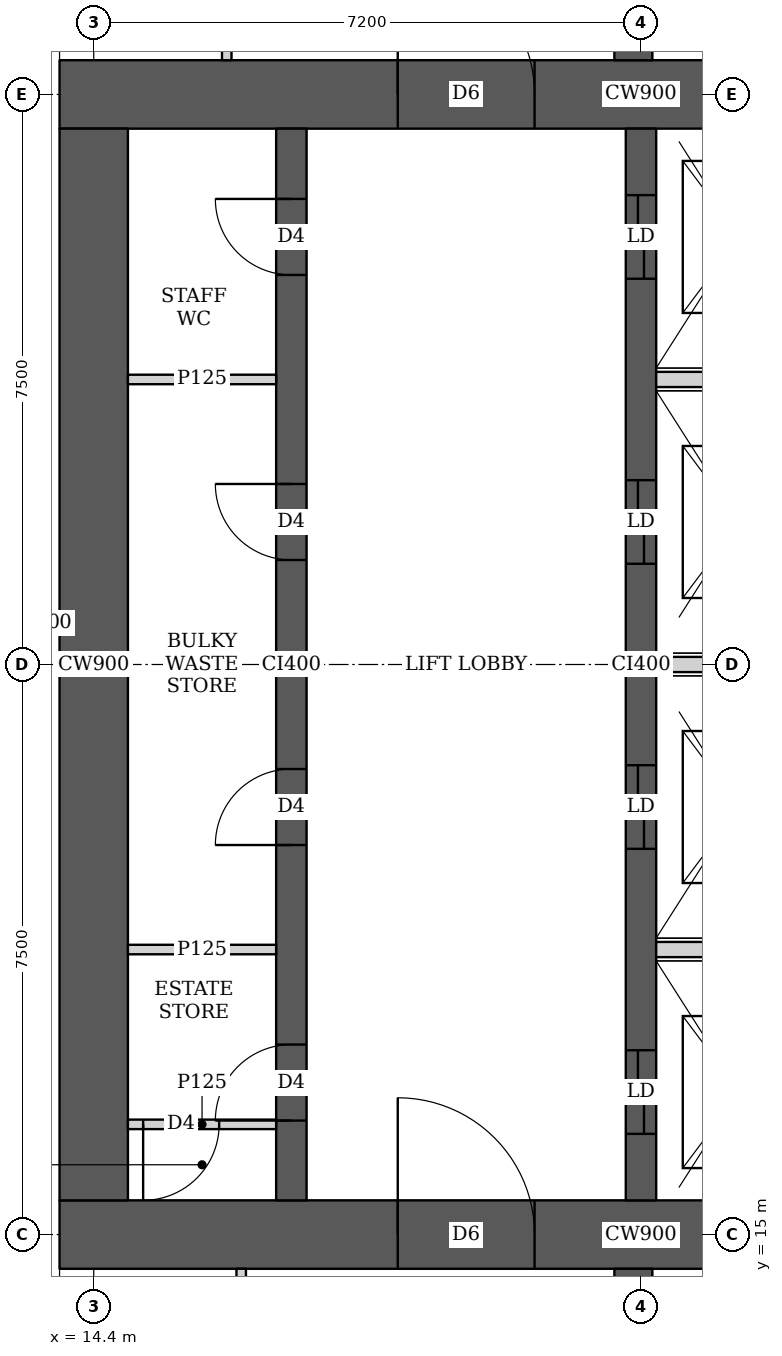
"""IFC4 building model, lengths in metres.
Left out: names, types, materials, properties, quantities, classifications, styles, units other than length and angle.
Written with IfcOpenShell. Run it as: python <this file> out.ifc"""

import sys

from ifc_helpers import new_model, si_unit, direction, frame, frame_2d, origin, place, context, subcontext, project, spatial, rectangle, extrude, element, fill, save


model = new_model("IFC4")
c1 = context("Model", 3, precision=1e-05, world=origin(), true_north=direction((0.0, 1.0)))
c2 = subcontext(c1, "Body", "Model", "MODEL_VIEW")
j1 = project(units=[si_unit("LENGTHUNIT", "METRE"), si_unit("PLANEANGLEUNIT", "RADIAN")], contexts=[c1])
p1 = place(None, origin())
s1 = spatial("IfcSite", under=j1, at=p1, CompositionType="ELEMENT")
p2 = place(p1, origin())
s2 = spatial("IfcBuilding", under=s1, at=p2, CompositionType="ELEMENT")
p3 = place(p2, frame((0.0, 0.0, 227.45)))
s3 = spatial("IfcBuildingStorey", under=s2, at=p3, CompositionType="ELEMENT", Elevation=227.45)
p4 = place(p3, frame((13.95, 15.0, 0.0), z_axis=(0.0, 0.0, 1.0), x_axis=(1.0, 0.0, 0.0)))
e1 = element("IfcWall", 1, at=p4, inside=s3, PredefinedType="SHEAR", context=c2, shape_type="SweptSolid", body=[
    extrude(rectangle(XDim=15.3, YDim=0.9, at=frame_2d((7.65, 0.0))), origin(), (0.0, 0.0, 1.0), 3.75),
])
p5 = place(p4, frame((4.45, 0.0, 0.0)))
e2 = element("IfcOpeningElement", 2, at=p5, cuts=e1, PredefinedType="OPENING", context=c2, shape_type="SweptSolid", body=[
    extrude(rectangle(XDim=1.8, YDim=2.1, at=frame_2d((0.9, 1.05))), frame((0.0, 0.46, 0.0), z_axis=(0.0, -1.0, 0.0), x_axis=(1.0, 0.0, 0.0)), (0.0, 0.0, 1.0), 0.92),
])
p6 = place(p4, frame((10.7, 0.0, 0.0)))
e3 = element("IfcOpeningElement", 3, at=p6, cuts=e1, PredefinedType="OPENING", context=c2, shape_type="SweptSolid", body=[
    extrude(rectangle(XDim=1.1, YDim=2.1, at=frame_2d((0.55, 1.05))), frame((0.0, 0.46, 0.0), z_axis=(0.0, -1.0, 0.0), x_axis=(1.0, 0.0, 0.0)), (0.0, 0.0, 1.0), 0.92),
])
p7 = place(p3, frame((13.95, 30.0, 0.0), z_axis=(0.0, 0.0, 1.0), x_axis=(1.0, 0.0, 0.0)))
e4 = element("IfcWall", 4, at=p7, inside=s3, PredefinedType="SHEAR", context=c2, shape_type="SweptSolid", body=[
    extrude(rectangle(XDim=15.3, YDim=0.9, at=frame_2d((7.65, 0.0))), origin(), (0.0, 0.0, 1.0), 3.75),
])
p8 = place(p7, frame((4.45, 0.0, 0.0)))
e5 = element("IfcOpeningElement", 5, at=p8, cuts=e4, PredefinedType="OPENING", context=c2, shape_type="SweptSolid", body=[
    extrude(rectangle(XDim=1.8, YDim=2.1, at=frame_2d((0.9, 1.05))), frame((0.0, 0.46, 0.0), z_axis=(0.0, -1.0, 0.0), x_axis=(1.0, 0.0, 0.0)), (0.0, 0.0, 1.0), 0.92),
])
p9 = place(p7, frame((10.7, 0.0, 0.0)))
e6 = element("IfcOpeningElement", 6, at=p9, cuts=e4, PredefinedType="OPENING", context=c2, shape_type="SweptSolid", body=[
    extrude(rectangle(XDim=1.1, YDim=2.1, at=frame_2d((0.55, 1.05))), frame((0.0, 0.46, 0.0), z_axis=(0.0, -1.0, 0.0), x_axis=(1.0, 0.0, 0.0)), (0.0, 0.0, 1.0), 0.92),
])
p10 = place(p3, frame((14.4, 15.45, 0.0), z_axis=(0.0, 0.0, 1.0), x_axis=(0.0, 1.0, 0.0)))
e7 = element("IfcWall", 7, at=p10, inside=s3, PredefinedType="SHEAR", context=c2, shape_type="SweptSolid", body=[
    extrude(rectangle(XDim=14.1, YDim=0.9, at=frame_2d((7.05, 0.0))), origin(), (0.0, 0.0, 1.0), 3.75),
])
p11 = place(p3, frame((17.0, 15.45, 0.0), z_axis=(0.0, 0.0, 1.0), x_axis=(0.0, 1.0, 0.0)))
e8 = element("IfcWall", 8, at=p11, inside=s3, PredefinedType="SHEAR", context=c2, shape_type="SweptSolid", body=[
    extrude(rectangle(XDim=14.1, YDim=0.4, at=frame_2d((7.05, 0.0))), origin(), (0.0, 0.0, 1.0), 3.75),
])
p12 = place(p11, frame((1.05, 0.0, 0.0)))
e9 = element("IfcOpeningElement", 9, at=p12, cuts=e8, PredefinedType="OPENING", context=c2, shape_type="SweptSolid", body=[
    extrude(rectangle(XDim=1.0, YDim=2.1, at=frame_2d((0.5, 1.05))), frame((0.0, 0.21, 0.0), z_axis=(0.0, -1.0, 0.0), x_axis=(1.0, 0.0, 0.0)), (0.0, 0.0, 1.0), 0.42),
])
p13 = place(p11, frame((4.675, 0.0, 0.0)))
e10 = element("IfcOpeningElement", 10, at=p13, cuts=e8, PredefinedType="OPENING", context=c2, shape_type="SweptSolid", body=[
    extrude(rectangle(XDim=1.0, YDim=2.1, at=frame_2d((0.5, 1.05))), frame((0.0, 0.21, 0.0), z_axis=(0.0, -1.0, 0.0), x_axis=(1.0, 0.0, 0.0)), (0.0, 0.0, 1.0), 0.42),
])
p14 = place(p11, frame((8.425, 0.0, 0.0)))
e11 = element("IfcOpeningElement", 11, at=p14, cuts=e8, PredefinedType="OPENING", context=c2, shape_type="SweptSolid", body=[
    extrude(rectangle(XDim=1.0, YDim=2.1, at=frame_2d((0.5, 1.05))), frame((0.0, 0.21, 0.0), z_axis=(0.0, -1.0, 0.0), x_axis=(1.0, 0.0, 0.0)), (0.0, 0.0, 1.0), 0.42),
])
p15 = place(p11, frame((12.175, 0.0, 0.0)))
e12 = element("IfcOpeningElement", 12, at=p15, cuts=e8, PredefinedType="OPENING", context=c2, shape_type="SweptSolid", body=[
    extrude(rectangle(XDim=1.0, YDim=2.1, at=frame_2d((0.5, 1.05))), frame((0.0, 0.21, 0.0), z_axis=(0.0, -1.0, 0.0), x_axis=(1.0, 0.0, 0.0)), (0.0, 0.0, 1.0), 0.42),
])
p16 = place(p3, frame((21.6, 15.45, 0.0), z_axis=(0.0, 0.0, 1.0), x_axis=(0.0, 1.0, 0.0)))
e13 = element("IfcWall", 13, at=p16, inside=s3, PredefinedType="SHEAR", context=c2, shape_type="SweptSolid", body=[
    extrude(rectangle(XDim=14.1, YDim=0.4, at=frame_2d((7.05, 0.0))), origin(), (0.0, 0.0, 1.0), 3.75),
])
p17 = place(p16, frame((0.875, 0.0, 0.0)))
e14 = element("IfcOpeningElement", 14, at=p17, cuts=e13, PredefinedType="OPENING", context=c2, shape_type="SweptSolid", body=[
    extrude(rectangle(XDim=1.1, YDim=2.1, at=frame_2d((0.55, 1.05))), frame((0.0, 0.21, 0.0), z_axis=(0.0, -1.0, 0.0), x_axis=(1.0, 0.0, 0.0)), (0.0, 0.0, 1.0), 0.42),
])
p18 = place(p16, frame((4.625, 0.0, 0.0)))
e15 = element("IfcOpeningElement", 15, at=p18, cuts=e13, PredefinedType="OPENING", context=c2, shape_type="SweptSolid", body=[
    extrude(rectangle(XDim=1.1, YDim=2.1, at=frame_2d((0.55, 1.05))), frame((0.0, 0.21, 0.0), z_axis=(0.0, -1.0, 0.0), x_axis=(1.0, 0.0, 0.0)), (0.0, 0.0, 1.0), 0.42),
])
p19 = place(p16, frame((8.375, 0.0, 0.0)))
e16 = element("IfcOpeningElement", 16, at=p19, cuts=e13, PredefinedType="OPENING", context=c2, shape_type="SweptSolid", body=[
    extrude(rectangle(XDim=1.1, YDim=2.1, at=frame_2d((0.55, 1.05))), frame((0.0, 0.21, 0.0), z_axis=(0.0, -1.0, 0.0), x_axis=(1.0, 0.0, 0.0)), (0.0, 0.0, 1.0), 0.42),
])
p20 = place(p16, frame((12.125, 0.0, 0.0)))
e17 = element("IfcOpeningElement", 17, at=p20, cuts=e13, PredefinedType="OPENING", context=c2, shape_type="SweptSolid", body=[
    extrude(rectangle(XDim=1.1, YDim=2.1, at=frame_2d((0.55, 1.05))), frame((0.0, 0.21, 0.0), z_axis=(0.0, -1.0, 0.0), x_axis=(1.0, 0.0, 0.0)), (0.0, 0.0, 1.0), 0.42),
])
for number, where, z_axis, x_axis in (
    (18, (21.5, 10.35, 0.0), (0.0, 0.0, 1.0), (0.0, 1.0, 0.0)),
    (19, (21.5, 30.45, 0.0), (0.0, 0.0, 1.0), (0.0, 1.0, 0.0)),
):
    element("IfcWall", number, at=place(p3, frame(where, z_axis=z_axis, x_axis=x_axis)), inside=s3, PredefinedType="SHEAR", context=c2, shape_type="SweptSolid", body=[
        extrude(rectangle(XDim=4.2, YDim=0.5, at=frame_2d((2.1, 0.0))), origin(), (0.0, 0.0, 1.0), 3.75),
    ])
p21 = place(p3, frame((16.34, 10.762, 0.0), z_axis=(0.0, 0.0, 1.0), x_axis=(0.0, 1.0, 0.0)))
e20 = element("IfcWall", 20, at=p21, inside=s3, PredefinedType="PARTITIONING", context=c2, shape_type="SweptSolid", body=[
    extrude(rectangle(XDim=3.788, YDim=0.125, at=frame_2d((1.894, 0.0))), origin(), (0.0, 0.0, 1.0), 3.5),
])
p22 = place(p21, frame((1.338, 0.0, 0.0)))
e21 = element("IfcOpeningElement", 21, at=p22, cuts=e20, PredefinedType="OPENING", context=c2, shape_type="SweptSolid", body=[
    extrude(rectangle(XDim=1.0, YDim=2.1, at=frame_2d((0.5, 1.05))), frame((0.0, 0.073, 0.0), z_axis=(0.0, -1.0, 0.0), x_axis=(1.0, 0.0, 0.0)), (0.0, 0.0, 1.0), 0.145),
])
p23 = place(p3, frame((16.15, 30.45, 0.0), z_axis=(0.0, 0.0, 1.0), x_axis=(0.0, 1.0, 0.0)))
e22 = element("IfcWall", 22, at=p23, inside=s3, PredefinedType="PARTITIONING", context=c2, shape_type="SweptSolid", body=[
    extrude(rectangle(XDim=4.137, YDim=0.125, at=frame_2d((2.068, 0.0))), origin(), (0.0, 0.0, 1.0), 3.5),
])
p24 = place(p23, frame((1.625, 0.0, 0.0)))
e23 = element("IfcOpeningElement", 23, at=p24, cuts=e22, PredefinedType="OPENING", context=c2, shape_type="SweptSolid", body=[
    extrude(rectangle(XDim=1.0, YDim=2.1, at=frame_2d((0.5, 1.05))), frame((0.0, 0.073, 0.0), z_axis=(0.0, -1.0, 0.0), x_axis=(1.0, 0.0, 0.0)), (0.0, 0.0, 1.0), 0.145),
])
p25 = place(p3, frame((14.85, 16.45, 0.0), z_axis=(0.0, 0.0, 1.0), x_axis=(1.0, 0.0, 0.0)))
e24 = element("IfcWall", 24, at=p25, inside=s3, PredefinedType="PARTITIONING", context=c2, shape_type="SweptSolid", body=[
    extrude(rectangle(XDim=1.95, YDim=0.125, at=frame_2d((0.975, 0.0))), origin(), (0.0, 0.0, 1.0), 3.5),
])
p26 = place(p25, frame((0.2, 0.0, 0.0)))
e25 = element("IfcOpeningElement", 25, at=p26, cuts=e24, PredefinedType="OPENING", context=c2, shape_type="SweptSolid", body=[
    extrude(rectangle(XDim=1.0, YDim=2.1, at=frame_2d((0.5, 1.05))), frame((0.0, 0.073, 0.0), z_axis=(0.0, -1.0, 0.0), x_axis=(1.0, 0.0, 0.0)), (0.0, 0.0, 1.0), 0.145),
])
for number, where, z_axis, x_axis in (
    (26, (14.85, 18.75, 0.0), (0.0, 0.0, 1.0), (1.0, 0.0, 0.0)),
    (27, (14.85, 26.25, 0.0), (0.0, 0.0, 1.0), (1.0, 0.0, 0.0)),
):
    element("IfcWall", number, at=place(p3, frame(where, z_axis=z_axis, x_axis=x_axis)), inside=s3, PredefinedType="PARTITIONING", context=c2, shape_type="SweptSolid", body=[
        extrude(rectangle(XDim=1.95, YDim=0.125, at=frame_2d((0.975, 0.0))), origin(), (0.0, 0.0, 1.0), 3.5),
    ])
for number, where, z_axis, x_axis in (
    (28, (21.8, 18.75, 0.0), (0.0, 0.0, 1.0), (1.0, 0.0, 0.0)),
    (29, (21.8, 22.5, 0.0), (0.0, 0.0, 1.0), (1.0, 0.0, 0.0)),
    (30, (21.8, 26.25, 0.0), (0.0, 0.0, 1.0), (1.0, 0.0, 0.0)),
):
    element("IfcWall", number, at=place(p3, frame(where, z_axis=z_axis, x_axis=x_axis)), inside=s3, PredefinedType="SOLIDWALL", context=c2, shape_type="SweptSolid", body=[
        extrude(rectangle(XDim=2.2, YDim=0.2, at=frame_2d((1.1, 0.0))), origin(), (0.0, 0.0, 1.0), 3.5),
    ])
p27 = place(p26, origin())
e31 = element("IfcDoor", 31, at=p27, inside=s3, OperationType="SINGLE_SWING_RIGHT", PredefinedType="DOOR", context=c2, shape_type="SweptSolid", body=[
    extrude(rectangle(XDim=1.0, YDim=2.1, at=frame_2d((0.5, 1.05))), frame((0.0, 0.025, 0.0), z_axis=(0.0, -1.0, 0.0), x_axis=(1.0, 0.0, 0.0)), (0.0, 0.0, 1.0), 0.05),
])
fill(e25, e31)
p28 = place(p12, origin())
e32 = element("IfcDoor", 32, at=p28, inside=s3, OperationType="SINGLE_SWING_LEFT", PredefinedType="DOOR", context=c2, shape_type="SweptSolid", body=[
    extrude(rectangle(XDim=1.0, YDim=2.1, at=frame_2d((0.5, 1.05))), frame((0.0, 0.025, 0.0), z_axis=(0.0, -1.0, 0.0), x_axis=(1.0, 0.0, 0.0)), (0.0, 0.0, 1.0), 0.05),
])
fill(e9, e32)
p29 = place(p13, origin())
e33 = element("IfcDoor", 33, at=p29, inside=s3, OperationType="SINGLE_SWING_LEFT", PredefinedType="DOOR", context=c2, shape_type="SweptSolid", body=[
    extrude(rectangle(XDim=1.0, YDim=2.1, at=frame_2d((0.5, 1.05))), frame((0.0, 0.025, 0.0), z_axis=(0.0, -1.0, 0.0), x_axis=(1.0, 0.0, 0.0)), (0.0, 0.0, 1.0), 0.05),
])
fill(e10, e33)
p30 = place(p14, origin())
e34 = element("IfcDoor", 34, at=p30, inside=s3, OperationType="SINGLE_SWING_RIGHT", PredefinedType="DOOR", context=c2, shape_type="SweptSolid", body=[
    extrude(rectangle(XDim=1.0, YDim=2.1, at=frame_2d((0.5, 1.05))), frame((0.0, 0.025, 0.0), z_axis=(0.0, -1.0, 0.0), x_axis=(1.0, 0.0, 0.0)), (0.0, 0.0, 1.0), 0.05),
])
fill(e11, e34)
p31 = place(p15, origin())
e35 = element("IfcDoor", 35, at=p31, inside=s3, OperationType="SINGLE_SWING_RIGHT", PredefinedType="DOOR", context=c2, shape_type="SweptSolid", body=[
    extrude(rectangle(XDim=1.0, YDim=2.1, at=frame_2d((0.5, 1.05))), frame((0.0, 0.025, 0.0), z_axis=(0.0, -1.0, 0.0), x_axis=(1.0, 0.0, 0.0)), (0.0, 0.0, 1.0), 0.05),
])
fill(e12, e35)
p32 = place(p5, origin())
e36 = element("IfcDoor", 36, at=p32, inside=s3, OperationType="DOUBLE_DOOR_SINGLE_SWING", PredefinedType="DOOR", context=c2, shape_type="SweptSolid", body=[
    extrude(rectangle(XDim=1.8, YDim=2.1, at=frame_2d((0.9, 1.05))), frame((0.0, 0.025, 0.0), z_axis=(0.0, -1.0, 0.0), x_axis=(1.0, 0.0, 0.0)), (0.0, 0.0, 1.0), 0.05),
])
fill(e2, e36)
p33 = place(p8, origin())
e37 = element("IfcDoor", 37, at=p33, inside=s3, OperationType="DOUBLE_DOOR_SINGLE_SWING", PredefinedType="DOOR", context=c2, shape_type="SweptSolid", body=[
    extrude(rectangle(XDim=1.8, YDim=2.1, at=frame_2d((0.9, 1.05))), frame((0.0, 0.025, 0.0), z_axis=(0.0, -1.0, 0.0), x_axis=(1.0, 0.0, 0.0)), (0.0, 0.0, 1.0), 0.05),
])
fill(e5, e37)
p34 = place(p17, origin())
e38 = element("IfcDoor", 38, at=p34, inside=s3, OperationType="DOUBLE_DOOR_SLIDING", PredefinedType="DOOR", context=c2, shape_type="SweptSolid", body=[
    extrude(rectangle(XDim=1.1, YDim=2.1, at=frame_2d((0.55, 1.05))), frame((0.0, 0.025, 0.0), z_axis=(0.0, -1.0, 0.0), x_axis=(1.0, 0.0, 0.0)), (0.0, 0.0, 1.0), 0.05),
])
fill(e14, e38)
p35 = place(p18, origin())
e39 = element("IfcDoor", 39, at=p35, inside=s3, OperationType="DOUBLE_DOOR_SLIDING", PredefinedType="DOOR", context=c2, shape_type="SweptSolid", body=[
    extrude(rectangle(XDim=1.1, YDim=2.1, at=frame_2d((0.55, 1.05))), frame((0.0, 0.025, 0.0), z_axis=(0.0, -1.0, 0.0), x_axis=(1.0, 0.0, 0.0)), (0.0, 0.0, 1.0), 0.05),
])
fill(e15, e39)
p36 = place(p19, origin())
e40 = element("IfcDoor", 40, at=p36, inside=s3, OperationType="DOUBLE_DOOR_SLIDING", PredefinedType="DOOR", context=c2, shape_type="SweptSolid", body=[
    extrude(rectangle(XDim=1.1, YDim=2.1, at=frame_2d((0.55, 1.05))), frame((0.0, 0.025, 0.0), z_axis=(0.0, -1.0, 0.0), x_axis=(1.0, 0.0, 0.0)), (0.0, 0.0, 1.0), 0.05),
])
fill(e16, e40)
p37 = place(p20, origin())
e41 = element("IfcDoor", 41, at=p37, inside=s3, OperationType="DOUBLE_DOOR_SLIDING", PredefinedType="DOOR", context=c2, shape_type="SweptSolid", body=[
    extrude(rectangle(XDim=1.1, YDim=2.1, at=frame_2d((0.55, 1.05))), frame((0.0, 0.025, 0.0), z_axis=(0.0, -1.0, 0.0), x_axis=(1.0, 0.0, 0.0)), (0.0, 0.0, 1.0), 0.05),
])
fill(e17, e41)
save(model, sys.argv[1])
